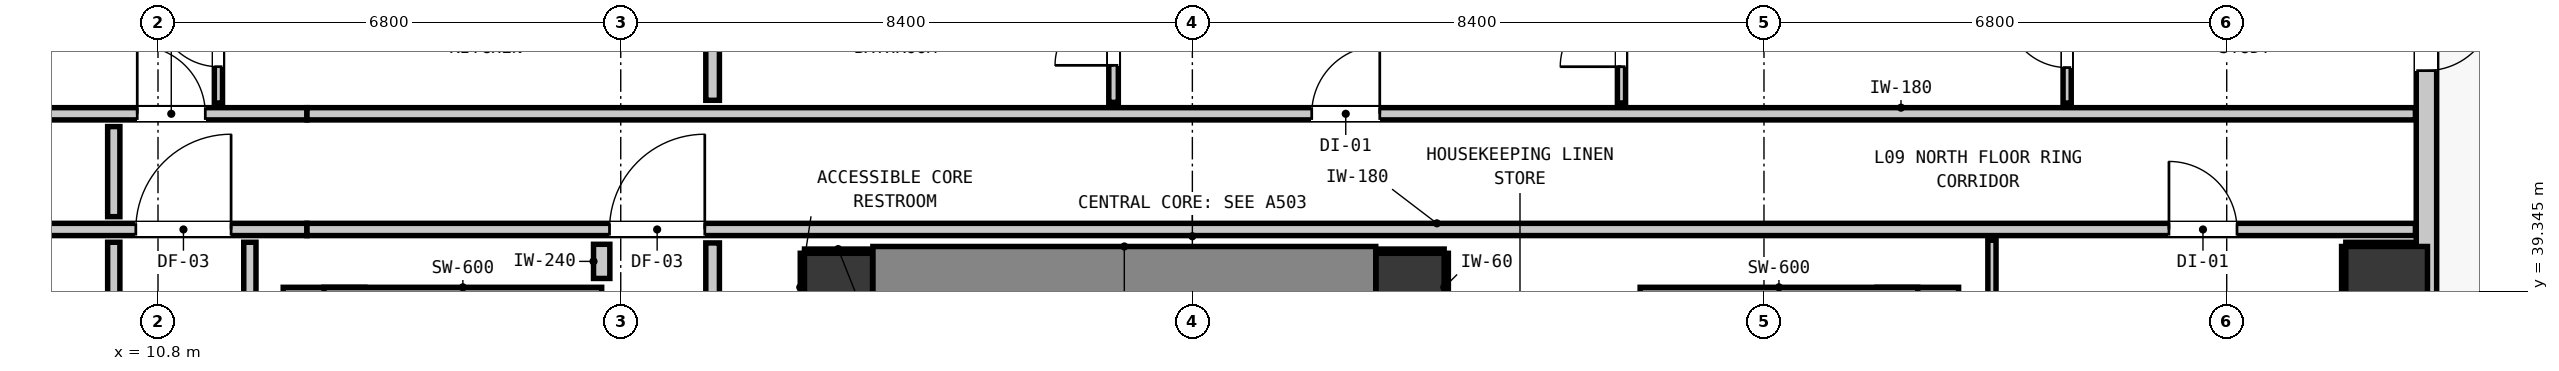
"""IFC4 building model, lengths in metres.
Left out: names, types, materials, properties, quantities, classifications, styles, units other than length and angle.
Written with IfcOpenShell. Run it as: python <this file> out.ifc"""

import sys

from ifc_helpers import new_model, si_unit, direction, frame, frame_2d, origin, origin_2d, place, context, subcontext, project, spatial, rectangle, extrude, element, fill, save


model = new_model("IFC4")
c1 = context("Model", 3, precision=1e-05, world=origin(), true_north=direction((0.0, 1.0)))
c2 = subcontext(c1, "Body", "Model", "MODEL_VIEW")
j1 = project(units=[si_unit("LENGTHUNIT", "METRE"), si_unit("PLANEANGLEUNIT", "RADIAN")], contexts=[c1])
p1 = place(None, origin())
s1 = spatial("IfcSite", under=j1, at=p1, CompositionType="ELEMENT")
p2 = place(p1, origin())
s2 = spatial("IfcBuilding", under=s1, at=p2, CompositionType="ELEMENT")
p3 = place(p2, frame((0.0, 0.0, 35.28)))
s3 = spatial("IfcBuildingStorey", under=s2, at=p3, CompositionType="ELEMENT", Elevation=35.28)
for number, where, z_axis, x_axis in (
    (1, (20.8, 39.4, 0.0), (0.0, 0.0, 1.0), (1.0, 0.0, 0.0)),
    (2, (29.2, 39.4, 0.0), (0.0, 0.0, 1.0), (1.0, 0.0, 0.0)),
):
    element("IfcColumn", number, at=place(p3, frame(where, z_axis=z_axis, x_axis=x_axis)), inside=s3, PredefinedType="COLUMN", context=c2, shape_type="SweptSolid", body=[
        extrude(rectangle(XDim=1.0, YDim=1.0, at=origin_2d()), origin(), (0.0, 0.0, 1.0), 3.32),
    ])
p4 = place(p3, frame((13.24, 31.205, 0.0), z_axis=(0.0, 0.0, 1.0), x_axis=(0.0, 1.0, 0.0)))
e3 = element("IfcWall", 3, at=p4, inside=s3, PredefinedType="SHEAR", context=c2, shape_type="SweptSolid", body=[
    extrude(rectangle(XDim=8.195, YDim=1.2, at=frame_2d((4.097, 0.0))), origin(), (0.0, 0.0, 1.0), 3.32),
])
p5 = place(p3, frame((13.24, 39.1, 0.0), z_axis=(0.0, 0.0, 1.0), x_axis=(1.0, 0.0, 0.0)))
e4 = element("IfcWall", 4, at=p5, inside=s3, PredefinedType="SHEAR", context=c2, shape_type="SweptSolid", body=[
    extrude(rectangle(XDim=4.08, YDim=0.6, at=frame_2d((2.04, 0.0))), origin(), (0.0, 0.0, 1.0), 3.32),
])
p6 = place(p3, frame((36.66, 31.205, 0.0), z_axis=(0.0, 0.0, 1.0), x_axis=(0.0, 1.0, 0.0)))
e5 = element("IfcWall", 5, at=p6, inside=s3, PredefinedType="SHEAR", context=c2, shape_type="SweptSolid", body=[
    extrude(rectangle(XDim=8.195, YDim=1.2, at=frame_2d((4.097, 0.0))), origin(), (0.0, 0.0, 1.0), 3.32),
])
p7 = place(p3, frame((32.58, 39.1, 0.0), z_axis=(0.0, 0.0, 1.0), x_axis=(1.0, 0.0, 0.0)))
e6 = element("IfcWall", 6, at=p7, inside=s3, PredefinedType="SHEAR", context=c2, shape_type="SweptSolid", body=[
    extrude(rectangle(XDim=4.08, YDim=0.6, at=frame_2d((2.04, 0.0))), origin(), (0.0, 0.0, 1.0), 3.32),
])
p8 = place(p3, frame((21.305, 39.4, 0.0), z_axis=(0.0, 0.0, 1.0), x_axis=(1.0, 0.0, 0.0)))
e7 = element("IfcWall", 7, at=p8, inside=s3, PredefinedType="SHEAR", context=c2, shape_type="SweptSolid", body=[
    extrude(rectangle(XDim=7.39, YDim=1.2, at=frame_2d((3.695, 0.0))), origin(), (0.0, 0.0, 1.0), 3.32),
])
p9 = place(p3, frame((43.55, 39.4, 0.0), z_axis=(0.0, 0.0, 1.0), x_axis=(1.0, 0.0, 0.0)))
e8 = element("IfcColumn", 8, at=p9, inside=s3, PredefinedType="COLUMN", context=c2, shape_type="SweptSolid", body=[
    extrude(rectangle(XDim=1.2, YDim=1.2, at=origin_2d()), origin(), (0.0, 0.0, 1.0), 3.32),
])
p10 = place(p3, frame((44.135, 44.835, 0.0), z_axis=(0.0, 0.0, 1.0), x_axis=(0.0, -1.0, 0.0)))
e9 = element("IfcWall", 9, at=p10, inside=s3, PredefinedType="STANDARD", context=c2, shape_type="SweptSolid", body=[
    extrude(rectangle(XDim=34.67, YDim=0.3, at=frame_2d((17.335, 0.0))), origin(), (0.0, 0.0, 1.0), 3.06),
])
p11 = place(p10, frame((1.251, 0.0, 0.0)))
e10 = element("IfcOpeningElement", 10, at=p11, cuts=e9, PredefinedType="OPENING", context=c2, shape_type="SweptSolid", body=[
    extrude(rectangle(XDim=1.0, YDim=2.15, at=frame_2d((0.5, 1.075))), frame((0.0, 0.16, 0.0), z_axis=(0.0, -1.0, 0.0), x_axis=(1.0, 0.0, 0.0)), (0.0, 0.0, 1.0), 0.32),
])
p12 = place(p10, frame((32.708, 0.0, 0.85)))
e11 = element("IfcOpeningElement", 11, at=p12, cuts=e9, PredefinedType="OPENING", context=c2, shape_type="SweptSolid", body=[
    extrude(rectangle(XDim=1.1, YDim=2.05, at=frame_2d((0.55, 1.025))), frame((0.0, 0.16, 0.0), z_axis=(0.0, -1.0, 0.0), x_axis=(1.0, 0.0, 0.0)), (0.0, 0.0, 1.0), 0.32),
])
p13 = place(p10, frame((17.935, 0.0, 0.85)))
e12 = element("IfcOpeningElement", 12, at=p13, cuts=e9, PredefinedType="OPENING", context=c2, shape_type="SweptSolid", body=[
    extrude(rectangle(XDim=1.1, YDim=2.05, at=frame_2d((0.55, 1.025))), frame((0.0, 0.16, 0.0), z_axis=(0.0, -1.0, 0.0), x_axis=(1.0, 0.0, 0.0)), (0.0, 0.0, 1.0), 0.32),
])
p14 = place(p10, frame((6.959, 0.0, 0.85)))
e13 = element("IfcOpeningElement", 13, at=p14, cuts=e9, PredefinedType="OPENING", context=c2, shape_type="SweptSolid", body=[
    extrude(rectangle(XDim=1.1, YDim=2.05, at=frame_2d((0.55, 1.025))), frame((0.0, 0.16, 0.0), z_axis=(0.0, -1.0, 0.0), x_axis=(1.0, 0.0, 0.0)), (0.0, 0.0, 1.0), 0.32),
])
p15 = place(p3, frame((2.661, 40.25, 0.0), z_axis=(0.0, 0.0, 1.0), x_axis=(1.0, 0.0, 0.0)))
e14 = element("IfcWall", 14, at=p15, inside=s3, PredefinedType="PARTITIONING", context=c2, shape_type="SweptSolid", body=[
    extrude(rectangle(XDim=10.328, YDim=0.18, at=frame_2d((5.164, 0.0))), origin(), (0.0, 0.0, 1.0), 2.445),
])
p16 = place(p15, frame((7.813, 0.0, 0.0)))
e15 = element("IfcOpeningElement", 15, at=p16, cuts=e14, PredefinedType="OPENING", context=c2, shape_type="SweptSolid", body=[
    extrude(rectangle(XDim=1.4, YDim=2.15, at=frame_2d((0.7, 1.075))), frame((0.0, 0.1, 0.0), z_axis=(0.0, -1.0, 0.0), x_axis=(1.0, 0.0, 0.0)), (0.0, 0.0, 1.0), 0.2),
])
p17 = place(p3, frame((12.989, 40.25, 0.0), z_axis=(0.0, 0.0, 1.0), x_axis=(1.0, 0.0, 0.0)))
e16 = element("IfcWall", 16, at=p17, inside=s3, PredefinedType="PARTITIONING", context=c2, shape_type="SweptSolid", body=[
    extrude(rectangle(XDim=30.984, YDim=0.18, at=frame_2d((15.492, 0.0))), origin(), (0.0, 0.0, 1.0), 3.06),
])
p18 = place(p17, frame((4.446, 0.0, 0.0)))
e17 = element("IfcOpeningElement", 17, at=p18, cuts=e16, PredefinedType="OPENING", context=c2, shape_type="SweptSolid", body=[
    extrude(rectangle(XDim=1.4, YDim=2.15, at=frame_2d((0.7, 1.075))), frame((0.0, 0.1, 0.0), z_axis=(0.0, -1.0, 0.0), x_axis=(1.0, 0.0, 0.0)), (0.0, 0.0, 1.0), 0.2),
])
p19 = place(p17, frame((27.362, 0.0, 0.0)))
e18 = element("IfcOpeningElement", 18, at=p19, cuts=e16, PredefinedType="OPENING", context=c2, shape_type="SweptSolid", body=[
    extrude(rectangle(XDim=1.0, YDim=2.15, at=frame_2d((0.5, 1.075))), frame((0.0, 0.1, 0.0), z_axis=(0.0, -1.0, 0.0), x_axis=(1.0, 0.0, 0.0)), (0.0, 0.0, 1.0), 0.2),
])
p20 = place(p3, frame((2.661, 41.95, 0.0), z_axis=(0.0, 0.0, 1.0), x_axis=(1.0, 0.0, 0.0)))
e19 = element("IfcWall", 19, at=p20, inside=s3, PredefinedType="PARTITIONING", context=c2, shape_type="SweptSolid", body=[
    extrude(rectangle(XDim=10.328, YDim=0.18, at=frame_2d((5.164, 0.0))), origin(), (0.0, 0.0, 1.0), 2.445),
])
p21 = place(p20, frame((7.834, 0.0, 0.0)))
e20 = element("IfcOpeningElement", 20, at=p21, cuts=e19, PredefinedType="OPENING", context=c2, shape_type="SweptSolid", body=[
    extrude(rectangle(XDim=1.0, YDim=2.15, at=frame_2d((0.5, 1.075))), frame((0.0, 0.1, 0.0), z_axis=(0.0, -1.0, 0.0), x_axis=(1.0, 0.0, 0.0)), (0.0, 0.0, 1.0), 0.2),
])
p22 = place(p3, frame((12.989, 41.95, 0.0), z_axis=(0.0, 0.0, 1.0), x_axis=(1.0, 0.0, 0.0)))
e21 = element("IfcWall", 21, at=p22, inside=s3, PredefinedType="PARTITIONING", context=c2, shape_type="SweptSolid", body=[
    extrude(rectangle(XDim=30.984, YDim=0.18, at=frame_2d((15.492, 0.0))), origin(), (0.0, 0.0, 1.0), 3.06),
])
p23 = place(p22, frame((14.765, 0.0, 0.0)))
e22 = element("IfcOpeningElement", 22, at=p23, cuts=e21, PredefinedType="OPENING", context=c2, shape_type="SweptSolid", body=[
    extrude(rectangle(XDim=1.0, YDim=2.15, at=frame_2d((0.5, 1.075))), frame((0.0, 0.1, 0.0), z_axis=(0.0, -1.0, 0.0), x_axis=(1.0, 0.0, 0.0)), (0.0, 0.0, 1.0), 0.2),
])
p24 = place(p3, frame((17.32, 39.53, 0.0), z_axis=(0.0, 0.0, 1.0), x_axis=(0.0, 1.0, 0.0)))
e23 = element("IfcWall", 23, at=p24, inside=s3, PredefinedType="PARTITIONING", context=c2, shape_type="SweptSolid", body=[
    extrude(rectangle(XDim=0.502, YDim=0.24, at=frame_2d((0.251, 0.0))), origin(), (0.0, 0.0, 1.0), 3.06),
])
p25 = place(p3, frame((18.95, 38.928, 0.0), z_axis=(0.0, 0.0, 1.0), x_axis=(0.0, 1.0, 0.0)))
e24 = element("IfcWall", 24, at=p25, inside=s3, PredefinedType="PARTITIONING", context=c2, shape_type="SweptSolid", body=[
    extrude(rectangle(XDim=1.124, YDim=0.2, at=frame_2d((0.562, 0.0))), origin(), (0.0, 0.0, 1.0), 3.06),
])
p26 = place(p3, frame((18.95, 42.148, 0.0), z_axis=(0.0, 0.0, 1.0), x_axis=(0.0, 1.0, 0.0)))
e25 = element("IfcWall", 25, at=p26, inside=s3, PredefinedType="PARTITIONING", context=c2, shape_type="SweptSolid", body=[
    extrude(rectangle(XDim=1.882, YDim=0.2, at=frame_2d((0.941, 0.0))), origin(), (0.0, 0.0, 1.0), 3.06),
])
p27 = place(p3, frame((10.15, 34.688, 0.0), z_axis=(0.0, 0.0, 1.0), x_axis=(0.0, 1.0, 0.0)))
e26 = element("IfcWall", 26, at=p27, inside=s3, PredefinedType="PARTITIONING", context=c2, shape_type="SweptSolid", body=[
    extrude(rectangle(XDim=5.374, YDim=0.18, at=frame_2d((2.687, 0.0))), origin(), (0.0, 0.0, 1.0), 3.06),
])
p28 = place(p3, frame((10.15, 40.438, 0.0), z_axis=(0.0, 0.0, 1.0), x_axis=(0.0, 1.0, 0.0)))
e27 = element("IfcWall", 27, at=p28, inside=s3, PredefinedType="PARTITIONING", context=c2, shape_type="SweptSolid", body=[
    extrude(rectangle(XDim=1.324, YDim=0.18, at=frame_2d((0.662, 0.0))), origin(), (0.0, 0.0, 1.0), 3.06),
])
p29 = place(p3, frame((12.15, 21.368, 0.0), z_axis=(0.0, 0.0, 1.0), x_axis=(0.0, 1.0, 0.0)))
e28 = element("IfcWall", 28, at=p29, inside=s3, PredefinedType="PARTITIONING", context=c2, shape_type="SweptSolid", body=[
    extrude(rectangle(XDim=18.694, YDim=0.18, at=frame_2d((9.347, 0.0))), origin(), (0.0, 0.0, 1.0), 3.06),
])
p30 = place(p3, frame((24.842, 42.118, 0.0), z_axis=(0.0, 0.0, 1.0), x_axis=(0.0, 1.0, 0.0)))
e29 = element("IfcWall", 29, at=p30, inside=s3, PredefinedType="PARTITIONING", context=c2, shape_type="SweptSolid", body=[
    extrude(rectangle(XDim=1.942, YDim=0.14, at=frame_2d((0.971, 0.0))), origin(), (0.0, 0.0, 1.0), 3.06),
])
p31 = place(p30, frame((0.544, 0.0, 0.0)))
e30 = element("IfcOpeningElement", 30, at=p31, cuts=e29, PredefinedType="OPENING", context=c2, shape_type="SweptSolid", body=[
    extrude(rectangle(XDim=0.86, YDim=2.02, at=frame_2d((0.43, 1.01))), frame((0.0, 0.08, 0.0), z_axis=(0.0, -1.0, 0.0), x_axis=(1.0, 0.0, 0.0)), (0.0, 0.0, 1.0), 0.16),
])
p32 = place(p3, frame((11.688, 42.108, 0.0), z_axis=(0.0, 0.0, 1.0), x_axis=(0.0, 1.0, 0.0)))
e31 = element("IfcWall", 31, at=p32, inside=s3, PredefinedType="PARTITIONING", context=c2, shape_type="SweptSolid", body=[
    extrude(rectangle(XDim=5.065, YDim=0.12, at=frame_2d((2.533, 0.0))), origin(), (0.0, 0.0, 1.0), 3.06),
])
p33 = place(p32, frame((0.534, 0.0, 0.0)))
e32 = element("IfcOpeningElement", 32, at=p33, cuts=e31, PredefinedType="OPENING", context=c2, shape_type="SweptSolid", body=[
    extrude(rectangle(XDim=0.9, YDim=2.1, at=frame_2d((0.45, 1.05))), frame((0.0, 0.07, 0.0), z_axis=(0.0, -1.0, 0.0), x_axis=(1.0, 0.0, 0.0)), (0.0, 0.0, 1.0), 0.14),
])
p34 = place(p32, frame((2.893, 0.0, 0.0)))
e33 = element("IfcOpeningElement", 33, at=p34, cuts=e31, PredefinedType="OPENING", context=c2, shape_type="SweptSolid", body=[
    extrude(rectangle(XDim=0.9, YDim=2.1, at=frame_2d((0.45, 1.05))), frame((0.0, 0.07, 0.0), z_axis=(0.0, -1.0, 0.0), x_axis=(1.0, 0.0, 0.0)), (0.0, 0.0, 1.0), 0.14),
])
p35 = place(p3, frame((32.306, 42.108, 0.0), z_axis=(0.0, 0.0, 1.0), x_axis=(0.0, 1.0, 0.0)))
e34 = element("IfcWall", 34, at=p35, inside=s3, PredefinedType="PARTITIONING", context=c2, shape_type="SweptSolid", body=[
    extrude(rectangle(XDim=1.962, YDim=0.12, at=frame_2d((0.981, 0.0))), origin(), (0.0, 0.0, 1.0), 3.06),
])
p36 = place(p35, frame((0.534, 0.0, 0.0)))
e35 = element("IfcOpeningElement", 35, at=p36, cuts=e34, PredefinedType="OPENING", context=c2, shape_type="SweptSolid", body=[
    extrude(rectangle(XDim=0.9, YDim=2.1, at=frame_2d((0.45, 1.05))), frame((0.0, 0.07, 0.0), z_axis=(0.0, -1.0, 0.0), x_axis=(1.0, 0.0, 0.0)), (0.0, 0.0, 1.0), 0.14),
])
p37 = place(p3, frame((37.75, 35.818, 0.0), z_axis=(0.0, 0.0, 1.0), x_axis=(0.0, 1.0, 0.0)))
e36 = element("IfcWall", 36, at=p37, inside=s3, PredefinedType="PARTITIONING", context=c2, shape_type="SweptSolid", body=[
    extrude(rectangle(XDim=4.274, YDim=0.12, at=frame_2d((2.137, 0.0))), origin(), (0.0, 0.0, 1.0), 3.06),
])
p38 = place(p3, frame((38.855, 42.108, 0.0), z_axis=(0.0, 0.0, 1.0), x_axis=(0.0, 1.0, 0.0)))
e37 = element("IfcWall", 37, at=p38, inside=s3, PredefinedType="PARTITIONING", context=c2, shape_type="SweptSolid", body=[
    extrude(rectangle(XDim=1.962, YDim=0.12, at=frame_2d((0.981, 0.0))), origin(), (0.0, 0.0, 1.0), 3.06),
])
p39 = place(p38, frame((0.521, 0.0, 0.0)))
e38 = element("IfcOpeningElement", 38, at=p39, cuts=e37, PredefinedType="OPENING", context=c2, shape_type="SweptSolid", body=[
    extrude(rectangle(XDim=0.9, YDim=2.1, at=frame_2d((0.45, 1.05))), frame((0.0, 0.07, 0.0), z_axis=(0.0, -1.0, 0.0), x_axis=(1.0, 0.0, 0.0)), (0.0, 0.0, 1.0), 0.14),
])
p40 = place(p3, frame((20.3, 39.932, 0.0), z_axis=(0.0, 0.0, 1.0), x_axis=(1.0, 0.0, 0.0)))
e39 = element("IfcWall", 39, at=p40, inside=s3, PredefinedType="PARTITIONING", context=c2, shape_type="SweptSolid", body=[
    extrude(rectangle(XDim=0.99, YDim=0.06, at=frame_2d((0.495, 0.0))), origin(), (0.0, 0.0, 1.0), 1.45),
])
p41 = place(p3, frame((20.268, 38.9, 0.0), z_axis=(0.0, 0.0, 1.0), x_axis=(0.0, 1.0, 0.0)))
e40 = element("IfcWall", 40, at=p41, inside=s3, PredefinedType="PARTITIONING", context=c2, shape_type="SweptSolid", body=[
    extrude(rectangle(XDim=1.0, YDim=0.06, at=frame_2d((0.5, 0.0))), origin(), (0.0, 0.0, 1.0), 1.45),
])
p42 = place(p3, frame((28.71, 39.932, 0.0), z_axis=(0.0, 0.0, 1.0), x_axis=(1.0, 0.0, 0.0)))
e41 = element("IfcWall", 41, at=p42, inside=s3, PredefinedType="PARTITIONING", context=c2, shape_type="SweptSolid", body=[
    extrude(rectangle(XDim=0.99, YDim=0.06, at=frame_2d((0.495, 0.0))), origin(), (0.0, 0.0, 1.0), 1.45),
])
p43 = place(p3, frame((29.732, 38.9, 0.0), z_axis=(0.0, 0.0, 1.0), x_axis=(0.0, 1.0, 0.0)))
e42 = element("IfcWall", 42, at=p43, inside=s3, PredefinedType="PARTITIONING", context=c2, shape_type="SweptSolid", body=[
    extrude(rectangle(XDim=1.0, YDim=0.06, at=frame_2d((0.5, 0.0))), origin(), (0.0, 0.0, 1.0), 1.45),
])
p44 = place(p3, frame((42.95, 40.032, 0.0), z_axis=(0.0, 0.0, 1.0), x_axis=(1.0, 0.0, 0.0)))
e43 = element("IfcWall", 43, at=p44, inside=s3, PredefinedType="PARTITIONING", context=c2, shape_type="SweptSolid", body=[
    extrude(rectangle(XDim=1.02, YDim=0.06, at=frame_2d((0.51, 0.0))), origin(), (0.0, 0.0, 1.0), 1.45),
])
p45 = place(p3, frame((42.918, 38.8, 0.0), z_axis=(0.0, 0.0, 1.0), x_axis=(0.0, 1.0, 0.0)))
e44 = element("IfcWall", 44, at=p45, inside=s3, PredefinedType="PARTITIONING", context=c2, shape_type="SweptSolid", body=[
    extrude(rectangle(XDim=1.2, YDim=0.06, at=frame_2d((0.6, 0.0))), origin(), (0.0, 0.0, 1.0), 1.45),
])
p46 = place(p11, origin())
e45 = element("IfcDoor", 45, at=p46, inside=s3, OperationType="SINGLE_SWING_LEFT", PredefinedType="DOOR", context=c2, shape_type="SweptSolid", body=[
    extrude(rectangle(XDim=1.0, YDim=2.15, at=frame_2d((0.5, 1.075))), frame((0.0, 0.025, 0.0), z_axis=(0.0, -1.0, 0.0), x_axis=(1.0, 0.0, 0.0)), (0.0, 0.0, 1.0), 0.05),
])
fill(e10, e45)
p47 = place(p18, origin())
e46 = element("IfcDoor", 46, at=p47, inside=s3, OperationType="SINGLE_SWING_RIGHT", PredefinedType="DOOR", context=c2, shape_type="SweptSolid", body=[
    extrude(rectangle(XDim=1.4, YDim=2.15, at=frame_2d((0.7, 1.075))), frame((0.0, 0.025, 0.0), z_axis=(0.0, -1.0, 0.0), x_axis=(1.0, 0.0, 0.0)), (0.0, 0.0, 1.0), 0.05),
])
fill(e17, e46)
p48 = place(p16, origin())
e47 = element("IfcDoor", 47, at=p48, inside=s3, OperationType="SINGLE_SWING_RIGHT", PredefinedType="DOOR", context=c2, shape_type="SweptSolid", body=[
    extrude(rectangle(XDim=1.4, YDim=2.15, at=frame_2d((0.7, 1.075))), frame((0.0, 0.025, 0.0), z_axis=(0.0, -1.0, 0.0), x_axis=(1.0, 0.0, 0.0)), (0.0, 0.0, 1.0), 0.05),
])
fill(e15, e47)
p49 = place(p21, origin())
e48 = element("IfcDoor", 48, at=p49, inside=s3, OperationType="SINGLE_SWING_LEFT", PredefinedType="DOOR", context=c2, shape_type="SweptSolid", body=[
    extrude(rectangle(XDim=1.0, YDim=2.15, at=frame_2d((0.5, 1.075))), frame((0.0, 0.025, 0.0), z_axis=(0.0, -1.0, 0.0), x_axis=(1.0, 0.0, 0.0)), (0.0, 0.0, 1.0), 0.05),
])
fill(e20, e48)
p50 = place(p33, origin())
e49 = element("IfcDoor", 49, at=p50, inside=s3, OperationType="SINGLE_SWING_RIGHT", PredefinedType="DOOR", context=c2, shape_type="SweptSolid", body=[
    extrude(rectangle(XDim=0.9, YDim=2.1, at=frame_2d((0.45, 1.05))), frame((0.0, 0.025, 0.0), z_axis=(0.0, -1.0, 0.0), x_axis=(1.0, 0.0, 0.0)), (0.0, 0.0, 1.0), 0.05),
])
fill(e32, e49)
p51 = place(p23, origin())
e50 = element("IfcDoor", 50, at=p51, inside=s3, OperationType="SINGLE_SWING_RIGHT", PredefinedType="DOOR", context=c2, shape_type="SweptSolid", body=[
    extrude(rectangle(XDim=1.0, YDim=2.15, at=frame_2d((0.5, 1.075))), frame((0.0, 0.025, 0.0), z_axis=(0.0, -1.0, 0.0), x_axis=(1.0, 0.0, 0.0)), (0.0, 0.0, 1.0), 0.05),
])
fill(e22, e50)
p52 = place(p31, origin())
e51 = element("IfcDoor", 51, at=p52, inside=s3, OperationType="SINGLE_SWING_LEFT", PredefinedType="DOOR", context=c2, shape_type="SweptSolid", body=[
    extrude(rectangle(XDim=0.86, YDim=2.02, at=frame_2d((0.43, 1.01))), frame((0.0, 0.025, 0.0), z_axis=(0.0, -1.0, 0.0), x_axis=(1.0, 0.0, 0.0)), (0.0, 0.0, 1.0), 0.05),
])
fill(e30, e51)
p53 = place(p36, origin())
e52 = element("IfcDoor", 52, at=p53, inside=s3, OperationType="SINGLE_SWING_LEFT", PredefinedType="DOOR", context=c2, shape_type="SweptSolid", body=[
    extrude(rectangle(XDim=0.9, YDim=2.1, at=frame_2d((0.45, 1.05))), frame((0.0, 0.025, 0.0), z_axis=(0.0, -1.0, 0.0), x_axis=(1.0, 0.0, 0.0)), (0.0, 0.0, 1.0), 0.05),
])
fill(e35, e52)
p54 = place(p39, origin())
e53 = element("IfcDoor", 53, at=p54, inside=s3, OperationType="SINGLE_SWING_RIGHT", PredefinedType="DOOR", context=c2, shape_type="SweptSolid", body=[
    extrude(rectangle(XDim=0.9, YDim=2.1, at=frame_2d((0.45, 1.05))), frame((0.0, 0.025, 0.0), z_axis=(0.0, -1.0, 0.0), x_axis=(1.0, 0.0, 0.0)), (0.0, 0.0, 1.0), 0.05),
])
fill(e38, e53)
p55 = place(p19, origin())
e54 = element("IfcDoor", 54, at=p55, inside=s3, OperationType="SINGLE_SWING_LEFT", PredefinedType="DOOR", context=c2, shape_type="SweptSolid", body=[
    extrude(rectangle(XDim=1.0, YDim=2.15, at=frame_2d((0.5, 1.075))), frame((0.0, 0.025, 0.0), z_axis=(0.0, -1.0, 0.0), x_axis=(1.0, 0.0, 0.0)), (0.0, 0.0, 1.0), 0.05),
])
fill(e18, e54)
save(model, sys.argv[1])
